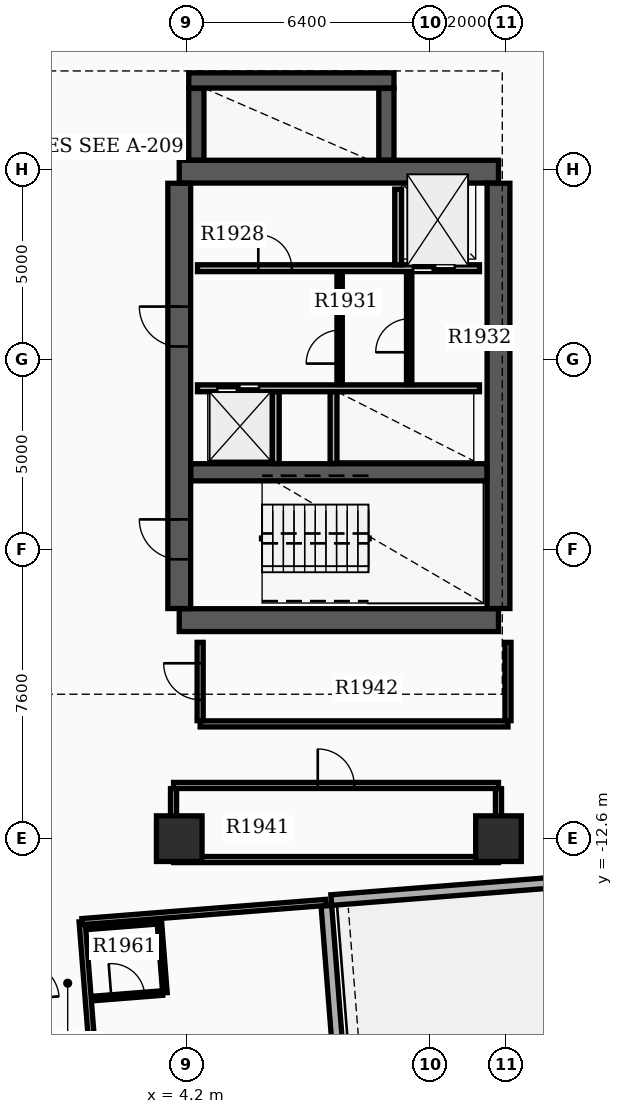
"""IFC4 building model, lengths in metres.
Left out: names, types, materials, properties, quantities, classifications, styles, units other than length and angle.
Written with IfcOpenShell. Run it as: python <this file> out.ifc"""

import sys

from ifc_helpers import new_model, si_unit, direction, frame, frame_2d, origin, origin_2d, place, context, subcontext, project, spatial, rectangle, extrude, element, fill, save


model = new_model("IFC4")
c1 = context("Model", 3, precision=1e-05, world=origin(), true_north=direction((0.0, 1.0)))
c2 = subcontext(c1, "Body", "Model", "MODEL_VIEW")
j1 = project(units=[si_unit("LENGTHUNIT", "METRE"), si_unit("PLANEANGLEUNIT", "RADIAN")], contexts=[c1])
p1 = place(None, origin())
s1 = spatial("IfcSite", under=j1, at=p1, CompositionType="ELEMENT")
p2 = place(p1, origin())
s2 = spatial("IfcBuilding", under=s1, at=p2, CompositionType="ELEMENT")
p3 = place(p2, frame((0.0, 0.0, 124.2)))
s3 = spatial("IfcBuildingStorey", under=s2, at=p3, CompositionType="ELEMENT", Elevation=124.2)
for number, where, z_axis, x_axis in (
    (1, (4.0, -6.85, 0.0), (0.0, 0.0, 1.0), (1.0, 0.0, 0.0)),
    (2, (4.0, 4.95, 0.0), (0.0, 0.0, 1.0), (1.0, 0.0, 0.0)),
):
    element("IfcWall", number, at=place(p3, frame(where, z_axis=z_axis, x_axis=x_axis)), inside=s3, PredefinedType="SHEAR", context=c2, shape_type="SweptSolid", body=[
        extrude(rectangle(XDim=8.4, YDim=0.6, at=frame_2d((4.2, 0.0))), origin(), (0.0, 0.0, 1.0), 3.7),
    ])
p4 = place(p3, frame((4.0, -6.545, 0.0), z_axis=(0.0, 0.0, 1.0), x_axis=(0.0, 1.0, 0.0)))
e3 = element("IfcWall", 3, at=p4, inside=s3, PredefinedType="SHEAR", context=c2, shape_type="SweptSolid", body=[
    extrude(rectangle(XDim=11.19, YDim=0.6, at=frame_2d((5.595, 0.0))), origin(), (0.0, 0.0, 1.0), 3.7),
])
p5 = place(p4, frame((1.295, 0.0, 0.0)))
e4 = element("IfcOpeningElement", 4, at=p5, cuts=e3, PredefinedType="OPENING", context=c2, shape_type="SweptSolid", body=[
    extrude(rectangle(XDim=1.05, YDim=2.15, at=frame_2d((0.525, 1.075))), frame((0.0, 0.31, 0.0), z_axis=(0.0, -1.0, 0.0), x_axis=(1.0, 0.0, 0.0)), (0.0, 0.0, 1.0), 0.62),
])
p6 = place(p4, frame((6.895, 0.0, 0.0)))
e5 = element("IfcOpeningElement", 5, at=p6, cuts=e3, PredefinedType="OPENING", context=c2, shape_type="SweptSolid", body=[
    extrude(rectangle(XDim=1.05, YDim=2.15, at=frame_2d((0.525, 1.075))), frame((0.0, 0.31, 0.0), z_axis=(0.0, -1.0, 0.0), x_axis=(1.0, 0.0, 0.0)), (0.0, 0.0, 1.0), 0.62),
])
p7 = place(p3, frame((12.4, -6.545, 0.0), z_axis=(0.0, 0.0, 1.0), x_axis=(0.0, 1.0, 0.0)))
e6 = element("IfcWall", 6, at=p7, inside=s3, PredefinedType="SHEAR", context=c2, shape_type="SweptSolid", body=[
    extrude(rectangle(XDim=11.19, YDim=0.6, at=frame_2d((5.595, 0.0))), origin(), (0.0, 0.0, 1.0), 3.7),
])
p8 = place(p3, frame((4.305, -2.96, 0.0), z_axis=(0.0, 0.0, 1.0), x_axis=(1.0, 0.0, 0.0)))
e7 = element("IfcWall", 7, at=p8, inside=s3, PredefinedType="SHEAR", context=c2, shape_type="SweptSolid", body=[
    extrude(rectangle(XDim=7.79, YDim=0.45, at=frame_2d((3.895, 0.0))), origin(), (0.0, 0.0, 1.0), 3.7),
])
p9 = place(p3, frame((4.45, 5.255, 0.0), z_axis=(0.0, 0.0, 1.0), x_axis=(0.0, 1.0, 0.0)))
e8 = element("IfcWall", 8, at=p9, inside=s3, PredefinedType="SHEAR", context=c2, shape_type="SweptSolid", body=[
    extrude(rectangle(XDim=1.885, YDim=0.4, at=frame_2d((0.942, 0.0))), origin(), (0.0, 0.0, 1.0), 3.7),
])
p10 = place(p3, frame((4.25, 7.35, 0.0), z_axis=(0.0, 0.0, 1.0), x_axis=(1.0, 0.0, 0.0)))
e9 = element("IfcWall", 9, at=p10, inside=s3, PredefinedType="SHEAR", context=c2, shape_type="SweptSolid", body=[
    extrude(rectangle(XDim=5.4, YDim=0.4, at=frame_2d((2.7, 0.0))), origin(), (0.0, 0.0, 1.0), 3.7),
])
p11 = place(p3, frame((9.45, 5.255, 0.0), z_axis=(0.0, 0.0, 1.0), x_axis=(0.0, 1.0, 0.0)))
e10 = element("IfcWall", 10, at=p11, inside=s3, PredefinedType="SHEAR", context=c2, shape_type="SweptSolid", body=[
    extrude(rectangle(XDim=1.885, YDim=0.4, at=frame_2d((0.942, 0.0))), origin(), (0.0, 0.0, 1.0), 3.7),
])
for number, where, z_axis, x_axis in (
    (11, (12.4, -12.6, 0.0), (0.0, 0.0, 1.0), (1.0, 0.0, 0.0)),
    (12, (4.0, -12.6, 0.0), (0.0, 0.0, 1.0), (1.0, 0.0, 0.0)),
):
    element("IfcColumn", number, at=place(p3, frame(where, z_axis=z_axis, x_axis=x_axis)), inside=s3, PredefinedType="COLUMN", context=c2, shape_type="SweptSolid", body=[
        extrude(rectangle(XDim=1.2, YDim=1.2, at=origin_2d()), origin(), (0.0, 0.0, 1.0), 3.9),
    ])
p12 = place(p3, frame((9.448, -34.405, 0.0), z_axis=(0.0, 0.0, 1.0), x_axis=(-0.078452802979, 0.996917828963, 0.0)))
e13 = element("IfcWall", 13, at=p12, inside=s3, PredefinedType="STANDARD", context=c2, shape_type="SweptSolid", body=[
    extrude(rectangle(XDim=20.1, YDim=0.28, at=frame_2d((10.05, 0.0))), origin(), (0.0, 0.0, 1.0), 2.97),
])
p13 = place(p12, frame((1.6, 0.0, 0.8)))
e14 = element("IfcOpeningElement", 14, at=p13, cuts=e13, PredefinedType="OPENING", context=c2, shape_type="SweptSolid", body=[
    extrude(rectangle(XDim=1.4, YDim=1.6, at=frame_2d((0.7, 0.8))), frame((0.0, 0.15, 0.0), z_axis=(0.0, -1.0, 0.0), x_axis=(1.0, 0.0, 0.0)), (0.0, 0.0, 1.0), 0.3),
])
p14 = place(p12, frame((4.8, 0.0, 0.8)))
e15 = element("IfcOpeningElement", 15, at=p14, cuts=e13, PredefinedType="OPENING", context=c2, shape_type="SweptSolid", body=[
    extrude(rectangle(XDim=1.4, YDim=1.6, at=frame_2d((0.7, 0.8))), frame((0.0, 0.15, 0.0), z_axis=(0.0, -1.0, 0.0), x_axis=(1.0, 0.0, 0.0)), (0.0, 0.0, 1.0), 0.3),
])
p15 = place(p12, frame((8.0, 0.0, 0.8)))
e16 = element("IfcOpeningElement", 16, at=p15, cuts=e13, PredefinedType="OPENING", context=c2, shape_type="SweptSolid", body=[
    extrude(rectangle(XDim=1.4, YDim=1.6, at=frame_2d((0.7, 0.8))), frame((0.0, 0.15, 0.0), z_axis=(0.0, -1.0, 0.0), x_axis=(1.0, 0.0, 0.0)), (0.0, 0.0, 1.0), 0.3),
])
p16 = place(p12, frame((11.7, 0.0, 0.8)))
e17 = element("IfcOpeningElement", 17, at=p16, cuts=e13, PredefinedType="OPENING", context=c2, shape_type="SweptSolid", body=[
    extrude(rectangle(XDim=1.4, YDim=1.6, at=frame_2d((0.7, 0.8))), frame((0.0, 0.15, 0.0), z_axis=(0.0, -1.0, 0.0), x_axis=(1.0, 0.0, 0.0)), (0.0, 0.0, 1.0), 0.3),
])
p17 = place(p3, frame((14.238, 7.721, 0.0), z_axis=(0.0, 0.0, 1.0), x_axis=(-0.078438149236, 0.996918982036, 0.0)))
e18 = element("IfcWall", 18, at=p17, inside=s3, PredefinedType="STANDARD", context=c2, shape_type="SweptSolid", body=[
    extrude(rectangle(XDim=6.86, YDim=0.28, at=frame_2d((3.43, 0.0))), origin(), (0.0, 0.0, 1.0), 2.97),
])
p18 = place(p3, frame((14.281, -13.722, 0.0), z_axis=(0.0, 0.0, 1.0), x_axis=(-0.99691915642, -0.078435932851, 0.0)))
e19 = element("IfcWall", 19, at=p18, inside=s3, PredefinedType="STANDARD", context=c2, shape_type="SweptSolid", body=[
    extrude(rectangle(XDim=6.3, YDim=0.28, at=frame_2d((3.15, 0.0))), origin(), (0.0, 0.0, 1.0), 2.97),
])
p19 = place(p3, frame((4.48, 2.41, 0.0), z_axis=(0.0, 0.0, 1.0), x_axis=(1.0, 0.0, 0.0)))
e20 = element("IfcWall", 20, at=p19, inside=s3, PredefinedType="SOLIDWALL", context=c2, shape_type="SweptSolid", body=[
    extrude(rectangle(XDim=7.42, YDim=0.18, at=frame_2d((3.71, 0.0))), origin(), (0.0, 0.0, 1.0), 2.96),
])
p20 = place(p19, frame((5.67, 0.0, 0.0)))
e21 = element("IfcOpeningElement", 21, at=p20, cuts=e20, PredefinedType="OPENING", context=c2, shape_type="SweptSolid", body=[
    extrude(rectangle(XDim=1.1, YDim=2.15, at=frame_2d((0.55, 1.075))), frame((0.0, 0.1, 0.0), z_axis=(0.0, -1.0, 0.0), x_axis=(1.0, 0.0, 0.0)), (0.0, 0.0, 1.0), 0.2),
])
p21 = place(p19, frame((1.6, 0.0, 0.0)))
e22 = element("IfcOpeningElement", 22, at=p21, cuts=e20, PredefinedType="OPENING", context=c2, shape_type="SweptSolid", body=[
    extrude(rectangle(XDim=0.88, YDim=2.1, at=frame_2d((0.44, 1.05))), frame((0.0, 0.1, 0.0), z_axis=(0.0, -1.0, 0.0), x_axis=(1.0, 0.0, 0.0)), (0.0, 0.0, 1.0), 0.2),
])
p22 = place(p3, frame((4.48, -0.75, 0.0), z_axis=(0.0, 0.0, 1.0), x_axis=(1.0, 0.0, 0.0)))
e23 = element("IfcWall", 23, at=p22, inside=s3, PredefinedType="SOLIDWALL", context=c2, shape_type="SweptSolid", body=[
    extrude(rectangle(XDim=7.42, YDim=0.18, at=frame_2d((3.71, 0.0))), origin(), (0.0, 0.0, 1.0), 2.96),
])
p23 = place(p22, frame((0.52, 0.0, 0.0)))
e24 = element("IfcOpeningElement", 24, at=p23, cuts=e23, PredefinedType="OPENING", context=c2, shape_type="SweptSolid", body=[
    extrude(rectangle(XDim=1.1, YDim=2.15, at=frame_2d((0.55, 1.075))), frame((0.0, 0.1, 0.0), z_axis=(0.0, -1.0, 0.0), x_axis=(1.0, 0.0, 0.0)), (0.0, 0.0, 1.0), 0.2),
])
p24 = place(p3, frame((9.76, 2.5, 0.0), z_axis=(0.0, 0.0, 1.0), x_axis=(0.0, 1.0, 0.0)))
e25 = element("IfcWall", 25, at=p24, inside=s3, PredefinedType="SOLIDWALL", context=c2, shape_type="SweptSolid", body=[
    extrude(rectangle(XDim=1.99, YDim=0.18, at=frame_2d((0.995, 0.0))), origin(), (0.0, 0.0, 1.0), 2.96),
])
for number, where, z_axis, x_axis in (
    (26, (6.54, -2.73, 0.0), (0.0, 0.0, 1.0), (0.0, 1.0, 0.0)),
    (27, (8.06, -2.73, 0.0), (0.0, 0.0, 1.0), (0.0, 1.0, 0.0)),
):
    element("IfcWall", number, at=place(p3, frame(where, z_axis=z_axis, x_axis=x_axis)), inside=s3, PredefinedType="SOLIDWALL", context=c2, shape_type="SweptSolid", body=[
        extrude(rectangle(XDim=1.89, YDim=0.18, at=frame_2d((0.945, 0.0))), origin(), (0.0, 0.0, 1.0), 2.96),
    ])
p25 = place(p3, frame((8.22, -0.65, 0.0), z_axis=(0.0, 0.0, 1.0), x_axis=(0.0, 1.0, 0.0)))
e28 = element("IfcWall", 28, at=p25, inside=s3, PredefinedType="SOLIDWALL", context=c2, shape_type="SweptSolid", body=[
    extrude(rectangle(XDim=2.96, YDim=0.14, at=frame_2d((1.48, 0.0))), origin(), (0.0, 0.0, 1.0), 2.96),
])
p26 = place(p25, frame((0.55, 0.0, 0.0)))
e29 = element("IfcOpeningElement", 29, at=p26, cuts=e28, PredefinedType="OPENING", context=c2, shape_type="SweptSolid", body=[
    extrude(rectangle(XDim=0.88, YDim=2.1, at=frame_2d((0.44, 1.05))), frame((0.0, 0.08, 0.0), z_axis=(0.0, -1.0, 0.0), x_axis=(1.0, 0.0, 0.0)), (0.0, 0.0, 1.0), 0.16),
])
p27 = place(p3, frame((10.05, -0.652, 0.0), z_axis=(0.0, 0.0, 1.0), x_axis=(0.0, 1.0, 0.0)))
e30 = element("IfcWall", 30, at=p27, inside=s3, PredefinedType="PARTITIONING", context=c2, shape_type="SweptSolid", body=[
    extrude(rectangle(XDim=2.962, YDim=0.14, at=frame_2d((1.481, 0.0))), origin(), (0.0, 0.0, 1.0), 2.96),
])
p28 = place(p27, frame((0.85, 0.0, 0.0)))
e31 = element("IfcOpeningElement", 31, at=p28, cuts=e30, PredefinedType="OPENING", context=c2, shape_type="SweptSolid", body=[
    extrude(rectangle(XDim=0.88, YDim=2.1, at=frame_2d((0.44, 1.05))), frame((0.0, 0.08, 0.0), z_axis=(0.0, -1.0, 0.0), x_axis=(1.0, 0.0, 0.0)), (0.0, 0.0, 1.0), 0.16),
])
p29 = place(p3, frame((3.85, -13.15, 0.0), z_axis=(0.0, 0.0, 1.0), x_axis=(1.0, 0.0, 0.0)))
e32 = element("IfcWall", 32, at=p29, inside=s3, PredefinedType="PARTITIONING", context=c2, shape_type="SweptSolid", body=[
    extrude(rectangle(XDim=8.55, YDim=0.16, at=frame_2d((4.275, 0.0))), origin(), (0.0, 0.0, 1.0), 2.96),
])
p30 = place(p3, frame((3.85, -11.2, 0.0), z_axis=(0.0, 0.0, 1.0), x_axis=(1.0, 0.0, 0.0)))
e33 = element("IfcWall", 33, at=p30, inside=s3, PredefinedType="PARTITIONING", context=c2, shape_type="SweptSolid", body=[
    extrude(rectangle(XDim=8.55, YDim=0.16, at=frame_2d((4.275, 0.0))), origin(), (0.0, 0.0, 1.0), 2.96),
])
p31 = place(p30, frame((3.795, 0.0, 0.0)))
e34 = element("IfcOpeningElement", 34, at=p31, cuts=e33, PredefinedType="OPENING", context=c2, shape_type="SweptSolid", body=[
    extrude(rectangle(XDim=0.96, YDim=2.15, at=frame_2d((0.48, 1.075))), frame((0.0, 0.09, 0.0), z_axis=(0.0, -1.0, 0.0), x_axis=(1.0, 0.0, 0.0)), (0.0, 0.0, 1.0), 0.18),
])
for number, where, z_axis, x_axis in (
    (35, (3.85, -13.065, 0.0), (0.0, 0.0, 1.0), (0.0, 1.0, 0.0)),
    (36, (12.4, -13.065, 0.0), (0.0, 0.0, 1.0), (0.0, 1.0, 0.0)),
):
    element("IfcWall", number, at=place(p3, frame(where, z_axis=z_axis, x_axis=x_axis)), inside=s3, PredefinedType="PARTITIONING", context=c2, shape_type="SweptSolid", body=[
        extrude(rectangle(XDim=1.78, YDim=0.16, at=frame_2d((0.89, 0.0))), origin(), (0.0, 0.0, 1.0), 2.96),
    ])
p32 = place(p3, frame((4.55, -9.58, 0.0), z_axis=(0.0, 0.0, 1.0), x_axis=(1.0, 0.0, 0.0)))
e37 = element("IfcWall", 37, at=p32, inside=s3, PredefinedType="PARTITIONING", context=c2, shape_type="SweptSolid", body=[
    extrude(rectangle(XDim=8.1, YDim=0.16, at=frame_2d((4.05, 0.0))), origin(), (0.0, 0.0, 1.0), 2.96),
])
p33 = place(p3, frame((4.55, -9.495, 0.0), z_axis=(0.0, 0.0, 1.0), x_axis=(0.0, 1.0, 0.0)))
e38 = element("IfcWall", 38, at=p33, inside=s3, PredefinedType="PARTITIONING", context=c2, shape_type="SweptSolid", body=[
    extrude(rectangle(XDim=2.06, YDim=0.16, at=frame_2d((1.03, 0.0))), origin(), (0.0, 0.0, 1.0), 2.96),
])
p34 = place(p33, frame((0.55, 0.0, 0.0)))
e39 = element("IfcOpeningElement", 39, at=p34, cuts=e38, PredefinedType="OPENING", context=c2, shape_type="SweptSolid", body=[
    extrude(rectangle(XDim=0.96, YDim=2.15, at=frame_2d((0.48, 1.075))), frame((0.0, 0.09, 0.0), z_axis=(0.0, -1.0, 0.0), x_axis=(1.0, 0.0, 0.0)), (0.0, 0.0, 1.0), 0.18),
])
p35 = place(p3, frame((12.65, -9.495, 0.0), z_axis=(0.0, 0.0, 1.0), x_axis=(0.0, 1.0, 0.0)))
e40 = element("IfcWall", 40, at=p35, inside=s3, PredefinedType="PARTITIONING", context=c2, shape_type="SweptSolid", body=[
    extrude(rectangle(XDim=2.06, YDim=0.16, at=frame_2d((1.03, 0.0))), origin(), (0.0, 0.0, 1.0), 2.96),
])
p36 = place(p3, frame((1.444, -14.782, 0.0), z_axis=(0.0, 0.0, 1.0), x_axis=(0.078454258523, -0.996917714418, 0.0)))
e41 = element("IfcWall", 41, at=p36, inside=s3, PredefinedType="PARTITIONING", context=c2, shape_type="SweptSolid", body=[
    extrude(rectangle(XDim=8.9, YDim=0.16, at=frame_2d((4.45, 0.0))), origin(), (0.0, 0.0, 1.0), 2.96),
])
p37 = place(p36, frame((7.5, 0.0, 0.0)))
e42 = element("IfcOpeningElement", 42, at=p37, cuts=e41, PredefinedType="OPENING", context=c2, shape_type="SweptSolid", body=[
    extrude(rectangle(XDim=0.96, YDim=2.15, at=frame_2d((0.48, 1.075))), frame((0.0, 0.09, 0.0), z_axis=(0.0, -1.0, 0.0), x_axis=(1.0, 0.0, 0.0)), (0.0, 0.0, 1.0), 0.18),
])
p38 = place(p3, frame((1.444, -14.782, 0.0), z_axis=(0.0, 0.0, 1.0), x_axis=(0.996919168289, 0.078435781998, 0.0)))
e43 = element("IfcWall", 43, at=p38, inside=s3, PredefinedType="PARTITIONING", context=c2, shape_type="SweptSolid", body=[
    extrude(rectangle(XDim=6.44, YDim=0.16, at=frame_2d((3.22, 0.0))), origin(), (0.0, 0.0, 1.0), 2.96),
])
p39 = place(p3, frame((1.744, -16.805, 0.0), z_axis=(0.0, 0.0, 1.0), x_axis=(0.996916400774, 0.0784709492, 0.0)))
e44 = element("IfcWall", 44, at=p39, inside=s3, PredefinedType="PARTITIONING", context=c2, shape_type="SweptSolid", body=[
    extrude(rectangle(XDim=1.82, YDim=0.12, at=frame_2d((0.91, 0.0))), origin(), (0.0, 0.0, 1.0), 2.96),
])
p40 = place(p39, frame((0.47, 0.0, 0.0)))
e45 = element("IfcOpeningElement", 45, at=p40, cuts=e44, PredefinedType="OPENING", context=c2, shape_type="SweptSolid", body=[
    extrude(rectangle(XDim=0.88, YDim=2.1, at=frame_2d((0.44, 1.05))), frame((0.0, 0.07, 0.0), z_axis=(0.0, -1.0, 0.0), x_axis=(1.0, 0.0, 0.0)), (0.0, 0.0, 1.0), 0.14),
])
p41 = place(p3, frame((1.596, -14.931, 0.0), z_axis=(0.0, 0.0, 1.0), x_axis=(0.996916400774, 0.0784709492, 0.0)))
e46 = element("IfcWall", 46, at=p41, inside=s3, PredefinedType="PARTITIONING", context=c2, shape_type="SweptSolid", body=[
    extrude(rectangle(XDim=1.82, YDim=0.12, at=frame_2d((0.91, 0.0))), origin(), (0.0, 0.0, 1.0), 2.96),
])
p42 = place(p3, frame((3.476, -14.783, 0.0), z_axis=(0.0, 0.0, 1.0), x_axis=(0.078444342213, -0.99691849475, 0.0)))
e47 = element("IfcWall", 47, at=p42, inside=s3, PredefinedType="PARTITIONING", context=c2, shape_type="SweptSolid", body=[
    extrude(rectangle(XDim=1.88, YDim=0.12, at=frame_2d((0.94, 0.0))), origin(), (0.0, 0.0, 1.0), 2.96),
])
p43 = place(p5, origin())
e48 = element("IfcDoor", 48, at=p43, inside=s3, OperationType="SINGLE_SWING_RIGHT", PredefinedType="DOOR", context=c2, shape_type="SweptSolid", body=[
    extrude(rectangle(XDim=1.05, YDim=2.15, at=frame_2d((0.525, 1.075))), frame((0.0, 0.025, 0.0), z_axis=(0.0, -1.0, 0.0), x_axis=(1.0, 0.0, 0.0)), (0.0, 0.0, 1.0), 0.05),
])
fill(e4, e48)
p44 = place(p6, origin())
e49 = element("IfcDoor", 49, at=p44, inside=s3, OperationType="SINGLE_SWING_RIGHT", PredefinedType="DOOR", context=c2, shape_type="SweptSolid", body=[
    extrude(rectangle(XDim=1.05, YDim=2.15, at=frame_2d((0.525, 1.075))), frame((0.0, 0.025, 0.0), z_axis=(0.0, -1.0, 0.0), x_axis=(1.0, 0.0, 0.0)), (0.0, 0.0, 1.0), 0.05),
])
fill(e5, e49)
p45 = place(p20, origin())
e50 = element("IfcDoor", 50, at=p45, inside=s3, OperationType="DOUBLE_DOOR_SLIDING", PredefinedType="DOOR", context=c2, shape_type="SweptSolid", body=[
    extrude(rectangle(XDim=1.1, YDim=2.15, at=frame_2d((0.55, 1.075))), frame((0.0, 0.025, 0.0), z_axis=(0.0, -1.0, 0.0), x_axis=(1.0, 0.0, 0.0)), (0.0, 0.0, 1.0), 0.05),
])
fill(e21, e50)
p46 = place(p23, origin())
e51 = element("IfcDoor", 51, at=p46, inside=s3, OperationType="DOUBLE_DOOR_SLIDING", PredefinedType="DOOR", context=c2, shape_type="SweptSolid", body=[
    extrude(rectangle(XDim=1.1, YDim=2.15, at=frame_2d((0.55, 1.075))), frame((0.0, 0.025, 0.0), z_axis=(0.0, -1.0, 0.0), x_axis=(1.0, 0.0, 0.0)), (0.0, 0.0, 1.0), 0.05),
])
fill(e24, e51)
p47 = place(p21, origin())
e52 = element("IfcDoor", 52, at=p47, inside=s3, OperationType="SINGLE_SWING_LEFT", PredefinedType="DOOR", context=c2, shape_type="SweptSolid", body=[
    extrude(rectangle(XDim=0.88, YDim=2.1, at=frame_2d((0.44, 1.05))), frame((0.0, 0.025, 0.0), z_axis=(0.0, -1.0, 0.0), x_axis=(1.0, 0.0, 0.0)), (0.0, 0.0, 1.0), 0.05),
])
fill(e22, e52)
p48 = place(p26, origin())
e53 = element("IfcDoor", 53, at=p48, inside=s3, OperationType="SINGLE_SWING_LEFT", PredefinedType="DOOR", context=c2, shape_type="SweptSolid", body=[
    extrude(rectangle(XDim=0.88, YDim=2.1, at=frame_2d((0.44, 1.05))), frame((0.0, 0.025, 0.0), z_axis=(0.0, -1.0, 0.0), x_axis=(1.0, 0.0, 0.0)), (0.0, 0.0, 1.0), 0.05),
])
fill(e29, e53)
p49 = place(p28, origin())
e54 = element("IfcDoor", 54, at=p49, inside=s3, OperationType="SINGLE_SWING_LEFT", PredefinedType="DOOR", context=c2, shape_type="SweptSolid", body=[
    extrude(rectangle(XDim=0.88, YDim=2.1, at=frame_2d((0.44, 1.05))), frame((0.0, 0.025, 0.0), z_axis=(0.0, -1.0, 0.0), x_axis=(1.0, 0.0, 0.0)), (0.0, 0.0, 1.0), 0.05),
])
fill(e31, e54)
p50 = place(p31, origin())
e55 = element("IfcDoor", 55, at=p50, inside=s3, OperationType="SINGLE_SWING_LEFT", PredefinedType="DOOR", context=c2, shape_type="SweptSolid", body=[
    extrude(rectangle(XDim=0.96, YDim=2.15, at=frame_2d((0.48, 1.075))), frame((0.0, 0.025, 0.0), z_axis=(0.0, -1.0, 0.0), x_axis=(1.0, 0.0, 0.0)), (0.0, 0.0, 1.0), 0.05),
])
fill(e34, e55)
p51 = place(p34, origin())
e56 = element("IfcDoor", 56, at=p51, inside=s3, OperationType="SINGLE_SWING_RIGHT", PredefinedType="DOOR", context=c2, shape_type="SweptSolid", body=[
    extrude(rectangle(XDim=0.96, YDim=2.15, at=frame_2d((0.48, 1.075))), frame((0.0, 0.025, 0.0), z_axis=(0.0, -1.0, 0.0), x_axis=(1.0, 0.0, 0.0)), (0.0, 0.0, 1.0), 0.05),
])
fill(e39, e56)
p52 = place(p40, origin())
e57 = element("IfcDoor", 57, at=p52, inside=s3, OperationType="SINGLE_SWING_LEFT", PredefinedType="DOOR", context=c2, shape_type="SweptSolid", body=[
    extrude(rectangle(XDim=0.88, YDim=2.1, at=frame_2d((0.44, 1.05))), frame((0.0, 0.025, 0.0), z_axis=(0.0, -1.0, 0.0), x_axis=(1.0, 0.0, 0.0)), (0.0, 0.0, 1.0), 0.05),
])
fill(e45, e57)
save(model, sys.argv[1])
